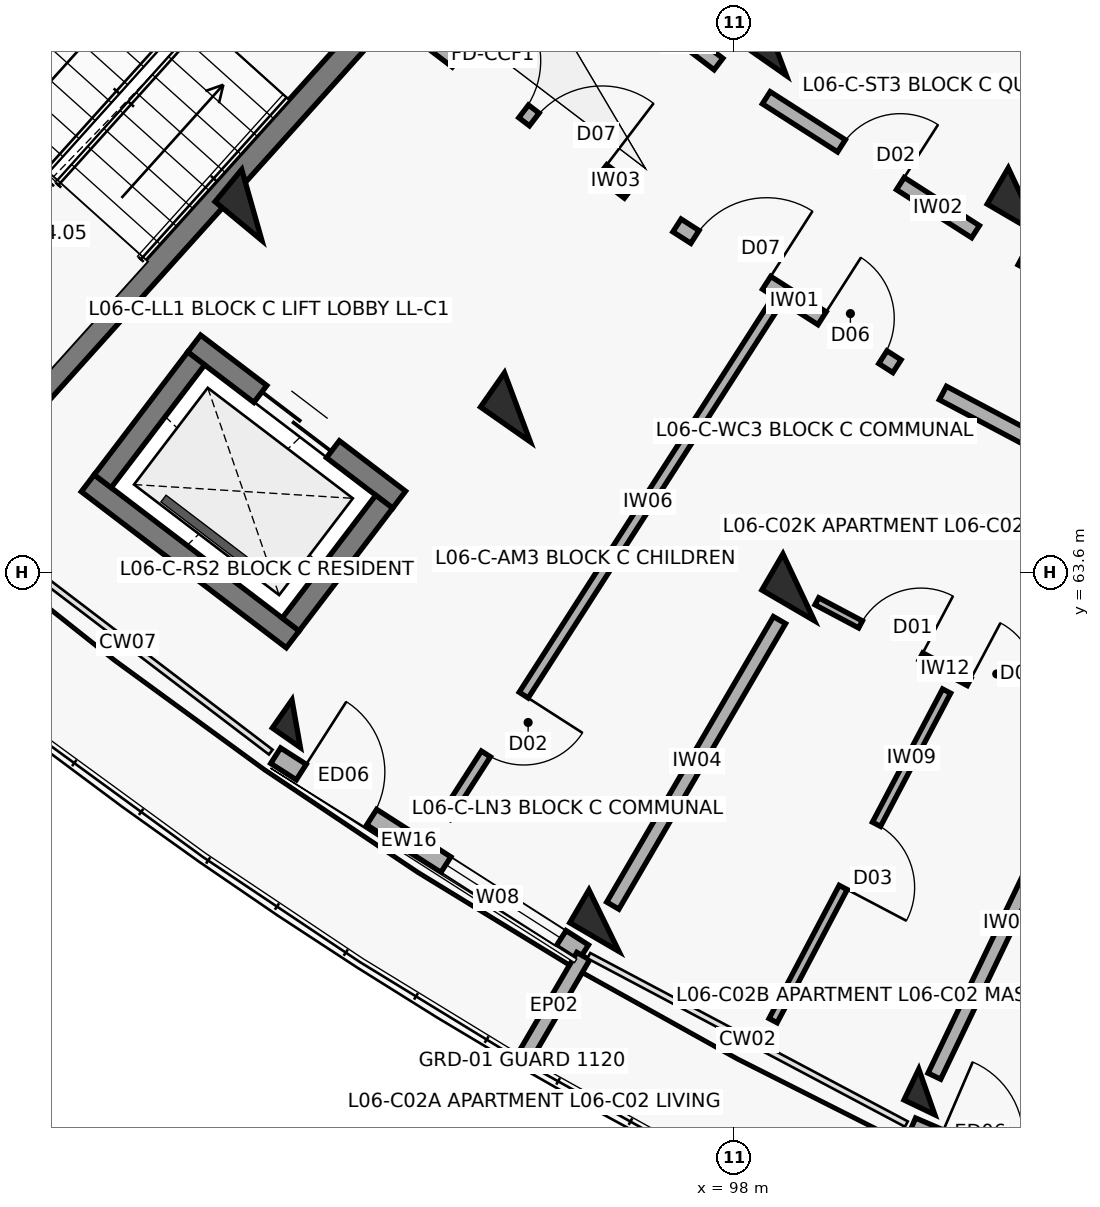
"""IFC4 building model, lengths in metres.
Left out: names, types, materials, properties, quantities, classifications, styles, units other than length and angle.
Written with IfcOpenShell. Run it as: python <this file> out.ifc"""

import sys

from ifc_helpers import new_model, si_unit, direction, frame, frame_2d, origin, origin_2d, place, context, subcontext, project, spatial, rectangle, extrude, element, fill, save


model = new_model("IFC4")
c1 = context("Model", 3, precision=1e-05, world=origin(), true_north=direction((0.0, 1.0)))
c2 = subcontext(c1, "Body", "Model", "MODEL_VIEW")
j1 = project(units=[si_unit("LENGTHUNIT", "METRE"), si_unit("PLANEANGLEUNIT", "RADIAN")], contexts=[c1])
p1 = place(None, origin())
s1 = spatial("IfcSite", under=j1, at=p1, CompositionType="ELEMENT")
p2 = place(p1, origin())
s2 = spatial("IfcBuilding", under=s1, at=p2, CompositionType="ELEMENT")
p3 = place(p2, frame((0.0, 0.0, 20.5)))
s3 = spatial("IfcBuildingStorey", under=s2, at=p3, CompositionType="ELEMENT", Elevation=20.5)
for number, where, z_axis, x_axis in (
    (1, (91.658, 68.43, 0.0), (0.0, 0.0, 1.0), (-0.638, -0.77, 0.0)),
    (2, (98.522, 70.587, 0.0), (0.0, 0.0, 1.0), (-0.573, -0.82, 0.0)),
    (3, (95.152, 65.768, 0.0), (0.0, 0.0, 1.0), (-0.573, -0.82, 0.0)),
):
    element("IfcColumn", number, at=place(p3, frame(where, z_axis=z_axis, x_axis=x_axis)), inside=s3, PredefinedType="COLUMN", context=c2, shape_type="SweptSolid", body=[
        extrude(rectangle(XDim=0.55, YDim=0.8, at=origin_2d()), origin(), (0.0, 0.0, 1.0), 3.1),
    ])
p4 = place(p3, frame((92.241, 61.605, 0.0), z_axis=(0.0, 0.0, 1.0), x_axis=(-0.573004420611, -0.819552276527, 0.0)))
e4 = element("IfcColumn", 4, at=p4, inside=s3, PredefinedType="COLUMN", context=c2, shape_type="SweptSolid", body=[
    extrude(rectangle(XDim=0.45, YDim=0.45, at=origin_2d()), origin(), (0.0, 0.0, 1.0), 3.1),
])
for number, where, z_axis, x_axis in (
    (5, (101.817, 68.478, 0.0), (0.0, 0.0, 1.0), (-0.504, -0.864, 0.0)),
    (6, (98.853, 63.4, 0.0), (0.0, 0.0, 1.0), (-0.504, -0.864, 0.0)),
):
    element("IfcColumn", number, at=place(p3, frame(where, z_axis=z_axis, x_axis=x_axis)), inside=s3, PredefinedType="COLUMN", context=c2, shape_type="SweptSolid", body=[
        extrude(rectangle(XDim=0.55, YDim=0.8, at=origin_2d()), origin(), (0.0, 0.0, 1.0), 3.1),
    ])
p5 = place(p3, frame((96.291, 59.013, 0.0), z_axis=(0.0, 0.0, 1.0), x_axis=(-0.504226211181, -0.863571611366, 0.0)))
e7 = element("IfcColumn", 7, at=p5, inside=s3, PredefinedType="COLUMN", context=c2, shape_type="SweptSolid", body=[
    extrude(rectangle(XDim=0.5, YDim=0.75, at=origin_2d()), origin(), (0.0, 0.0, 1.0), 3.1),
])
p6 = place(p3, frame((100.539, 56.76, 0.0), z_axis=(0.0, 0.0, 1.0), x_axis=(-0.432085748802, -0.901832526405, 0.0)))
e8 = element("IfcColumn", 8, at=p6, inside=s3, PredefinedType="COLUMN", context=c2, shape_type="SweptSolid", body=[
    extrude(rectangle(XDim=0.45, YDim=0.45, at=origin_2d()), origin(), (0.0, 0.0, 1.0), 3.1),
])
p7 = place(p3, frame((91.972, 61.184, 0.0), z_axis=(0.0, 0.0, 1.0), x_axis=(0.84226218024, -0.539068103061, 0.0)))
e9 = element("IfcWall", 9, at=p7, inside=s3, PredefinedType="SOLIDWALL", context=c2, shape_type="SweptSolid", body=[
    extrude(rectangle(XDim=4.809, YDim=0.242, at=frame_2d((2.404, 0.0))), origin(), (0.0, 0.0, 1.0), 2.25),
])
p8 = place(p7, frame((0.4, 0.0, 0.0)))
e10 = element("IfcOpeningElement", 10, at=p8, cuts=e9, PredefinedType="OPENING", context=c2, shape_type="SweptSolid", body=[
    extrude(rectangle(XDim=1.1, YDim=2.15, at=frame_2d((0.55, 1.075))), frame((0.0, 0.131, 0.0), z_axis=(0.0, -1.0, 0.0), x_axis=(1.0, 0.0, 0.0)), (0.0, 0.0, 1.0), 0.262),
])
p9 = place(p7, frame((2.659, 0.0, 0.35)))
e11 = element("IfcOpeningElement", 11, at=p9, cuts=e9, PredefinedType="OPENING", context=c2, shape_type="SweptSolid", body=[
    extrude(rectangle(XDim=1.8, YDim=1.65, at=frame_2d((0.9, 0.825))), frame((0.0, 0.131, 0.0), z_axis=(0.0, -1.0, 0.0), x_axis=(1.0, 0.0, 0.0)), (0.0, 0.0, 1.0), 0.262),
])
p10 = place(p3, frame((96.019, 58.547, 0.0), z_axis=(0.0, 0.0, 1.0), x_axis=(-0.504228145431, -0.863570481985, 0.0)))
e12 = element("IfcWall", 12, at=p10, inside=s3, PredefinedType="PARAPET", context=c2, shape_type="SweptSolid", body=[
    extrude(rectangle(XDim=1.53, YDim=0.195, at=frame_2d((0.765, 0.0))), origin(), (0.0, 0.0, 1.0), 2.25),
])
p11 = place(p3, frame((100.341, 56.301, 0.0), z_axis=(0.0, 0.0, 1.0), x_axis=(0.918737524932, -0.39486878869, 0.0)))
e13 = element("IfcWall", 13, at=p11, inside=s3, PredefinedType="SOLIDWALL", context=c2, shape_type="SweptSolid", body=[
    extrude(rectangle(XDim=4.809, YDim=0.252, at=frame_2d((2.405, 0.0))), origin(), (0.0, 0.0, 1.0), 2.25),
])
p12 = place(p11, frame((0.4, 0.0, 0.0)))
e14 = element("IfcOpeningElement", 14, at=p12, cuts=e13, PredefinedType="OPENING", context=c2, shape_type="SweptSolid", body=[
    extrude(rectangle(XDim=1.1, YDim=2.15, at=frame_2d((0.55, 1.075))), frame((0.0, 0.136, 0.0), z_axis=(0.0, -1.0, 0.0), x_axis=(1.0, 0.0, 0.0)), (0.0, 0.0, 1.0), 0.272),
])
p13 = place(p11, frame((2.659, 0.0, 0.35)))
e15 = element("IfcOpeningElement", 15, at=p13, cuts=e13, PredefinedType="OPENING", context=c2, shape_type="SweptSolid", body=[
    extrude(rectangle(XDim=1.8, YDim=1.65, at=frame_2d((0.9, 0.825))), frame((0.0, 0.136, 0.0), z_axis=(0.0, -1.0, 0.0), x_axis=(1.0, 0.0, 0.0)), (0.0, 0.0, 1.0), 0.272),
])
p14 = place(p3, frame((90.671, 73.287, 0.0), z_axis=(0.0, 0.0, 1.0), x_axis=(-0.668885797871, -0.743365179038, 0.0)))
e16 = element("IfcWall", 16, at=p14, inside=s3, PredefinedType="SHEAR", context=c2, shape_type="SweptSolid", body=[
    extrude(rectangle(XDim=7.69, YDim=0.3, at=frame_2d((3.845, 0.0))), origin(), (0.0, 0.0, 1.0), 3.1),
])
p15 = place(p3, frame((93.325, 70.899, 0.0), z_axis=(0.0, 0.0, 1.0), x_axis=(-0.668868253964, -0.743380964808, 0.0)))
e17 = element("IfcWall", 17, at=p15, inside=s3, PredefinedType="SHEAR", context=c2, shape_type="SweptSolid", body=[
    extrude(rectangle(XDim=7.69, YDim=0.3, at=frame_2d((3.845, 0.0))), origin(), (0.0, 0.0, 1.0), 3.1),
])
p16 = place(p3, frame((90.899, 66.607, 0.0), z_axis=(0.0, 0.0, 1.0), x_axis=(0.795439986025, -0.606032365994, 0.0)))
e18 = element("IfcWall", 18, at=p16, inside=s3, PredefinedType="SHEAR", context=c2, shape_type="SweptSolid", body=[
    extrude(rectangle(XDim=3.39, YDim=0.28, at=frame_2d((1.695, 0.0))), origin(), (0.0, 0.0, 1.0), 3.1),
])
p17 = place(p16, frame((1.095, 0.0, 0.0)))
e19 = element("IfcOpeningElement", 19, at=p17, cuts=e18, PredefinedType="OPENING", context=c2, shape_type="SweptSolid", body=[
    extrude(rectangle(XDim=1.2, YDim=2.15, at=frame_2d((0.6, 1.075))), frame((0.0, 0.15, 0.0), z_axis=(0.0, -1.0, 0.0), x_axis=(1.0, 0.0, 0.0)), (0.0, 0.0, 1.0), 0.3),
])
p18 = place(p3, frame((89.5, 64.77, 0.0), z_axis=(0.0, 0.0, 1.0), x_axis=(0.795474703455, -0.605986795371, 0.0)))
e20 = element("IfcWall", 20, at=p18, inside=s3, PredefinedType="SHEAR", context=c2, shape_type="SweptSolid", body=[
    extrude(rectangle(XDim=3.39, YDim=0.28, at=frame_2d((1.695, 0.0))), origin(), (0.0, 0.0, 1.0), 3.1),
])
p19 = place(p3, frame((90.926, 66.411, 0.0), z_axis=(0.0, 0.0, 1.0), x_axis=(-0.605948992168, -0.795503500238, 0.0)))
e21 = element("IfcWall", 21, at=p19, inside=s3, PredefinedType="SHEAR", context=c2, shape_type="SweptSolid", body=[
    extrude(rectangle(XDim=2.03, YDim=0.28, at=frame_2d((1.015, 0.0))), origin(), (0.0, 0.0, 1.0), 3.1),
])
p20 = place(p3, frame((93.4, 64.526, 0.0), z_axis=(0.0, 0.0, 1.0), x_axis=(-0.605891019062, -0.795547656033, 0.0)))
e22 = element("IfcWall", 22, at=p20, inside=s3, PredefinedType="SHEAR", context=c2, shape_type="SweptSolid", body=[
    extrude(rectangle(XDim=2.03, YDim=0.28, at=frame_2d((1.015, 0.0))), origin(), (0.0, 0.0, 1.0), 3.1),
])
p21 = place(p3, frame((94.001, 70.602, 0.0), z_axis=(0.0, 0.0, 1.0), x_axis=(0.795498026433, -0.605956178235, 0.0)))
e23 = element("IfcWall", 23, at=p21, inside=s3, PredefinedType="SOLIDWALL", context=c2, shape_type="SweptSolid", body=[
    extrude(rectangle(XDim=3.296, YDim=0.21, at=frame_2d((1.648, 0.0))), origin(), (0.0, 0.0, 1.0), 2.08),
])
p22 = place(p21, frame((0.45, 0.0, 0.0)))
e24 = element("IfcOpeningElement", 24, at=p22, cuts=e23, PredefinedType="OPENING", context=c2, shape_type="SweptSolid", body=[
    extrude(rectangle(XDim=1.1, YDim=2.15, at=frame_2d((0.55, 1.075))), frame((0.0, 0.115, 0.0), z_axis=(0.0, -1.0, 0.0), x_axis=(1.0, 0.0, 0.0)), (0.0, 0.0, 1.0), 0.23),
])
p23 = place(p21, frame((1.726, 0.0, 0.0)))
e25 = element("IfcOpeningElement", 25, at=p23, cuts=e23, PredefinedType="OPENING", context=c2, shape_type="SweptSolid", body=[
    extrude(rectangle(XDim=1.12, YDim=2.15, at=frame_2d((0.56, 1.075))), frame((0.0, 0.115, 0.0), z_axis=(0.0, -1.0, 0.0), x_axis=(1.0, 0.0, 0.0)), (0.0, 0.0, 1.0), 0.23),
])
p24 = place(p3, frame((95.309, 72.18, 0.0), z_axis=(0.0, 0.0, 1.0), x_axis=(0.795463961918, -0.606000895453, 0.0)))
e26 = element("IfcWall", 26, at=p24, inside=s3, PredefinedType="SOLIDWALL", context=c2, shape_type="SweptSolid", body=[
    extrude(rectangle(XDim=3.129, YDim=0.19, at=frame_2d((1.564, 0.0))), origin(), (0.0, 0.0, 1.0), 2.08),
])
p25 = place(p24, frame((1.004, 0.0, 0.0)))
e27 = element("IfcOpeningElement", 27, at=p25, cuts=e26, PredefinedType="OPENING", context=c2, shape_type="SweptSolid", body=[
    extrude(rectangle(XDim=1.12, YDim=2.15, at=frame_2d((0.56, 1.075))), frame((0.0, 0.105, 0.0), z_axis=(0.0, -1.0, 0.0), x_axis=(1.0, 0.0, 0.0)), (0.0, 0.0, 1.0), 0.21),
])
p26 = place(p3, frame((97.252, 68.161, 0.0), z_axis=(0.0, 0.0, 1.0), x_axis=(0.842289466461, -0.53902546757, 0.0)))
e28 = element("IfcWall", 28, at=p26, inside=s3, PredefinedType="SOLIDWALL", context=c2, shape_type="SweptSolid", body=[
    extrude(rectangle(XDim=3.436, YDim=0.2, at=frame_2d((1.718, 0.0))), origin(), (0.0, 0.0, 1.0), 2.08),
])
p27 = place(p26, frame((0.28, 0.0, 0.0)))
e29 = element("IfcOpeningElement", 29, at=p27, cuts=e28, PredefinedType="OPENING", context=c2, shape_type="SweptSolid", body=[
    extrude(rectangle(XDim=1.12, YDim=2.15, at=frame_2d((0.56, 1.075))), frame((0.0, 0.11, 0.0), z_axis=(0.0, -1.0, 0.0), x_axis=(1.0, 0.0, 0.0)), (0.0, 0.0, 1.0), 0.22),
])
p28 = place(p26, frame((2.266, 0.0, 0.0)))
e30 = element("IfcOpeningElement", 30, at=p28, cuts=e28, PredefinedType="OPENING", context=c2, shape_type="SweptSolid", body=[
    extrude(rectangle(XDim=0.95, YDim=2.1, at=frame_2d((0.475, 1.05))), frame((0.0, 0.11, 0.0), z_axis=(0.0, -1.0, 0.0), x_axis=(1.0, 0.0, 0.0)), (0.0, 0.0, 1.0), 0.22),
])
p29 = place(p3, frame((98.427, 69.841, 0.0), z_axis=(0.0, 0.0, 1.0), x_axis=(0.842280895761, -0.539038860043, 0.0)))
e31 = element("IfcWall", 31, at=p29, inside=s3, PredefinedType="SOLIDWALL", context=c2, shape_type="SweptSolid", body=[
    extrude(rectangle(XDim=3.269, YDim=0.19, at=frame_2d((1.634, 0.0))), origin(), (0.0, 0.0, 1.0), 2.08),
])
p30 = place(p29, frame((1.174, 0.0, 0.0)))
e32 = element("IfcOpeningElement", 32, at=p30, cuts=e31, PredefinedType="OPENING", context=c2, shape_type="SweptSolid", body=[
    extrude(rectangle(XDim=0.92, YDim=2.1, at=frame_2d((0.46, 1.05))), frame((0.0, 0.105, 0.0), z_axis=(0.0, -1.0, 0.0), x_axis=(1.0, 0.0, 0.0)), (0.0, 0.0, 1.0), 0.21),
])
p31 = place(p3, frame((98.504, 67.072, 0.0), z_axis=(0.0, 0.0, 1.0), x_axis=(-0.540338452216, -0.841447774408, 0.0)))
e33 = element("IfcWall", 33, at=p31, inside=s3, PredefinedType="PARTITIONING", context=c2, shape_type="SweptSolid", body=[
    extrude(rectangle(XDim=7.95, YDim=0.14, at=frame_2d((3.975, 0.0))), origin(), (0.0, 0.0, 1.0), 2.08),
])
p32 = place(p31, frame((6.05, 0.0, 0.0)))
e34 = element("IfcOpeningElement", 34, at=p32, cuts=e33, PredefinedType="OPENING", context=c2, shape_type="SweptSolid", body=[
    extrude(rectangle(XDim=0.92, YDim=2.1, at=frame_2d((0.46, 1.05))), frame((0.0, 0.08, 0.0), z_axis=(0.0, -1.0, 0.0), x_axis=(1.0, 0.0, 0.0)), (0.0, 0.0, 1.0), 0.16),
])
p33 = place(p3, frame((100.75, 65.956, 0.0), z_axis=(0.0, 0.0, 1.0), x_axis=(0.883440266101, -0.468543803963, 0.0)))
e35 = element("IfcWall", 35, at=p33, inside=s3, PredefinedType="SOLIDWALL", context=c2, shape_type="SweptSolid", body=[
    extrude(rectangle(XDim=3.436, YDim=0.2, at=frame_2d((1.718, 0.0))), origin(), (0.0, 0.0, 1.0), 2.08),
])
p34 = place(p33, frame((1.228, 0.0, 0.0)))
e36 = element("IfcOpeningElement", 36, at=p34, cuts=e35, PredefinedType="OPENING", context=c2, shape_type="SweptSolid", body=[
    extrude(rectangle(XDim=0.98, YDim=2.15, at=frame_2d((0.49, 1.075))), frame((0.0, 0.11, 0.0), z_axis=(0.0, -1.0, 0.0), x_axis=(1.0, 0.0, 0.0)), (0.0, 0.0, 1.0), 0.22),
])
p35 = place(p3, frame((101.784, 67.726, 0.0), z_axis=(0.0, 0.0, 1.0), x_axis=(0.883444301944, -0.468536194293, 0.0)))
e37 = element("IfcWall", 37, at=p35, inside=s3, PredefinedType="SOLIDWALL", context=c2, shape_type="SweptSolid", body=[
    extrude(rectangle(XDim=3.269, YDim=0.19, at=frame_2d((1.634, 0.0))), origin(), (0.0, 0.0, 1.0), 2.08),
])
p36 = place(p35, frame((1.164, 0.0, 0.0)))
e38 = element("IfcOpeningElement", 38, at=p36, cuts=e37, PredefinedType="OPENING", context=c2, shape_type="SweptSolid", body=[
    extrude(rectangle(XDim=0.94, YDim=2.1, at=frame_2d((0.47, 1.05))), frame((0.0, 0.105, 0.0), z_axis=(0.0, -1.0, 0.0), x_axis=(1.0, 0.0, 0.0)), (0.0, 0.0, 1.0), 0.21),
])
p37 = place(p3, frame((99.093, 63.216, 0.0), z_axis=(0.0, 0.0, 1.0), x_axis=(0.883432667361, -0.468558131121, 0.0)))
e39 = element("IfcWall", 39, at=p37, inside=s3, PredefinedType="PARTITIONING", context=c2, shape_type="SweptSolid", body=[
    extrude(rectangle(XDim=3.797, YDim=0.105, at=frame_2d((1.899, 0.0))), origin(), (0.0, 0.0, 1.0), 2.08),
])
p38 = place(p37, frame((0.65, 0.0, 0.0)))
e40 = element("IfcOpeningElement", 40, at=p38, cuts=e39, PredefinedType="OPENING", context=c2, shape_type="SweptSolid", body=[
    extrude(rectangle(XDim=0.9, YDim=2.1, at=frame_2d((0.45, 1.05))), frame((0.0, 0.062, 0.0), z_axis=(0.0, -1.0, 0.0), x_axis=(1.0, 0.0, 0.0)), (0.0, 0.0, 1.0), 0.125),
])
p39 = place(p37, frame((2.267, 0.0, 0.0)))
e41 = element("IfcOpeningElement", 41, at=p39, cuts=e39, PredefinedType="OPENING", context=c2, shape_type="SweptSolid", body=[
    extrude(rectangle(XDim=0.88, YDim=2.1, at=frame_2d((0.44, 1.05))), frame((0.0, 0.062, 0.0), z_axis=(0.0, -1.0, 0.0), x_axis=(1.0, 0.0, 0.0)), (0.0, 0.0, 1.0), 0.125),
])
p40 = place(p3, frame((100.799, 62.034, 0.0), z_axis=(0.0, 0.0, 1.0), x_axis=(-0.465869641373, -0.884853364828, 0.0)))
e42 = element("IfcWall", 42, at=p40, inside=s3, PredefinedType="PARTITIONING", context=c2, shape_type="SweptSolid", body=[
    extrude(rectangle(XDim=4.9, YDim=0.12, at=frame_2d((2.45, 0.0))), origin(), (0.0, 0.0, 1.0), 2.08),
])
p41 = place(p40, frame((1.98, 0.0, 0.0)))
e43 = element("IfcOpeningElement", 43, at=p41, cuts=e42, PredefinedType="OPENING", context=c2, shape_type="SweptSolid", body=[
    extrude(rectangle(XDim=0.94, YDim=2.1, at=frame_2d((0.47, 1.05))), frame((0.0, 0.07, 0.0), z_axis=(0.0, -1.0, 0.0), x_axis=(1.0, 0.0, 0.0)), (0.0, 0.0, 1.0), 0.14),
])
p42 = place(p3, frame((98.601, 62.968, 0.0), z_axis=(0.0, 0.0, 1.0), x_axis=(-0.504216452091, -0.863577309475, 0.0)))
e44 = element("IfcWall", 44, at=p42, inside=s3, PredefinedType="SOLIDWALL", context=c2, shape_type="SweptSolid", body=[
    extrude(rectangle(XDim=4.35, YDim=0.185, at=frame_2d((2.175, 0.0))), origin(), (0.0, 0.0, 1.0), 2.08),
])
p43 = place(p3, frame((102.518, 60.89, 0.0), z_axis=(0.0, 0.0, 1.0), x_axis=(-0.432108769108, -0.901821496561, 0.0)))
e45 = element("IfcWall", 45, at=p43, inside=s3, PredefinedType="SOLIDWALL", context=c2, shape_type="SweptSolid", body=[
    extrude(rectangle(XDim=4.35, YDim=0.185, at=frame_2d((2.175, 0.0))), origin(), (0.0, 0.0, 1.0), 2.08),
])
p44 = place(p8, origin())
e46 = element("IfcDoor", 46, at=p44, inside=s3, OperationType="SINGLE_SWING_LEFT", PredefinedType="DOOR", context=c2, shape_type="SweptSolid", body=[
    extrude(rectangle(XDim=1.1, YDim=2.15, at=frame_2d((0.55, 1.075))), frame((0.0, 0.025, 0.0), z_axis=(0.0, -1.0, 0.0), x_axis=(1.0, 0.0, 0.0)), (0.0, 0.0, 1.0), 0.05),
])
fill(e10, e46)
p45 = place(p9, origin())
e47 = element("IfcWindow", 47, at=p45, inside=s3, PartitioningType="TRIPLE_PANEL_VERTICAL", PredefinedType="WINDOW", context=c2, shape_type="SweptSolid", body=[
    extrude(rectangle(XDim=1.8, YDim=1.65, at=frame_2d((0.9, 0.825))), frame((0.0, 0.03, 0.0), z_axis=(0.0, -1.0, 0.0), x_axis=(1.0, 0.0, 0.0)), (0.0, 0.0, 1.0), 0.06),
])
fill(e11, e47)
p46 = place(p17, origin())
e48 = element("IfcDoor", 48, at=p46, inside=s3, OperationType="DOUBLE_DOOR_SLIDING", PredefinedType="DOOR", context=c2, shape_type="SweptSolid", body=[
    extrude(rectangle(XDim=1.2, YDim=2.15, at=frame_2d((0.6, 1.075))), frame((0.0, 0.025, 0.0), z_axis=(0.0, -1.0, 0.0), x_axis=(1.0, 0.0, 0.0)), (0.0, 0.0, 1.0), 0.05),
])
fill(e19, e48)
p47 = place(p22, origin())
e49 = element("IfcDoor", 49, at=p47, inside=s3, OperationType="SINGLE_SWING_LEFT", PredefinedType="DOOR", context=c2, shape_type="SweptSolid", body=[
    extrude(rectangle(XDim=1.1, YDim=2.15, at=frame_2d((0.55, 1.075))), frame((0.0, 0.025, 0.0), z_axis=(0.0, -1.0, 0.0), x_axis=(1.0, 0.0, 0.0)), (0.0, 0.0, 1.0), 0.05),
])
fill(e24, e49)
p48 = place(p23, origin())
e50 = element("IfcDoor", 50, at=p48, inside=s3, OperationType="SINGLE_SWING_RIGHT", PredefinedType="DOOR", context=c2, shape_type="SweptSolid", body=[
    extrude(rectangle(XDim=1.12, YDim=2.15, at=frame_2d((0.56, 1.075))), frame((0.0, 0.025, 0.0), z_axis=(0.0, -1.0, 0.0), x_axis=(1.0, 0.0, 0.0)), (0.0, 0.0, 1.0), 0.05),
])
fill(e25, e50)
p49 = place(p27, origin())
e51 = element("IfcDoor", 51, at=p49, inside=s3, OperationType="SINGLE_SWING_RIGHT", PredefinedType="DOOR", context=c2, shape_type="SweptSolid", body=[
    extrude(rectangle(XDim=1.12, YDim=2.15, at=frame_2d((0.56, 1.075))), frame((0.0, 0.025, 0.0), z_axis=(0.0, -1.0, 0.0), x_axis=(1.0, 0.0, 0.0)), (0.0, 0.0, 1.0), 0.05),
])
fill(e29, e51)
p50 = place(p28, origin())
e52 = element("IfcDoor", 52, at=p50, inside=s3, OperationType="SINGLE_SWING_LEFT", PredefinedType="DOOR", context=c2, shape_type="SweptSolid", body=[
    extrude(rectangle(XDim=0.95, YDim=2.1, at=frame_2d((0.475, 1.05))), frame((0.0, 0.025, 0.0), z_axis=(0.0, -1.0, 0.0), x_axis=(1.0, 0.0, 0.0)), (0.0, 0.0, 1.0), 0.05),
])
fill(e30, e52)
p51 = place(p30, origin())
e53 = element("IfcDoor", 53, at=p51, inside=s3, OperationType="SINGLE_SWING_RIGHT", PredefinedType="DOOR", context=c2, shape_type="SweptSolid", body=[
    extrude(rectangle(XDim=0.92, YDim=2.1, at=frame_2d((0.46, 1.05))), frame((0.0, 0.025, 0.0), z_axis=(0.0, -1.0, 0.0), x_axis=(1.0, 0.0, 0.0)), (0.0, 0.0, 1.0), 0.05),
])
fill(e32, e53)
p52 = place(p32, origin())
e54 = element("IfcDoor", 54, at=p52, inside=s3, OperationType="SINGLE_SWING_LEFT", PredefinedType="DOOR", context=c2, shape_type="SweptSolid", body=[
    extrude(rectangle(XDim=0.92, YDim=2.1, at=frame_2d((0.46, 1.05))), frame((0.0, 0.025, 0.0), z_axis=(0.0, -1.0, 0.0), x_axis=(1.0, 0.0, 0.0)), (0.0, 0.0, 1.0), 0.05),
])
fill(e34, e54)
p53 = place(p38, origin())
e55 = element("IfcDoor", 55, at=p53, inside=s3, OperationType="SINGLE_SWING_RIGHT", PredefinedType="DOOR", context=c2, shape_type="SweptSolid", body=[
    extrude(rectangle(XDim=0.9, YDim=2.1, at=frame_2d((0.45, 1.05))), frame((0.0, 0.025, 0.0), z_axis=(0.0, -1.0, 0.0), x_axis=(1.0, 0.0, 0.0)), (0.0, 0.0, 1.0), 0.05),
])
fill(e40, e55)
p54 = place(p39, origin())
e56 = element("IfcDoor", 56, at=p54, inside=s3, OperationType="SINGLE_SWING_LEFT", PredefinedType="DOOR", context=c2, shape_type="SweptSolid", body=[
    extrude(rectangle(XDim=0.88, YDim=2.1, at=frame_2d((0.44, 1.05))), frame((0.0, 0.025, 0.0), z_axis=(0.0, -1.0, 0.0), x_axis=(1.0, 0.0, 0.0)), (0.0, 0.0, 1.0), 0.05),
])
fill(e41, e56)
p55 = place(p41, origin())
e57 = element("IfcDoor", 57, at=p55, inside=s3, OperationType="SINGLE_SWING_RIGHT", PredefinedType="DOOR", context=c2, shape_type="SweptSolid", body=[
    extrude(rectangle(XDim=0.94, YDim=2.1, at=frame_2d((0.47, 1.05))), frame((0.0, 0.025, 0.0), z_axis=(0.0, -1.0, 0.0), x_axis=(1.0, 0.0, 0.0)), (0.0, 0.0, 1.0), 0.05),
])
fill(e43, e57)
save(model, sys.argv[1])
